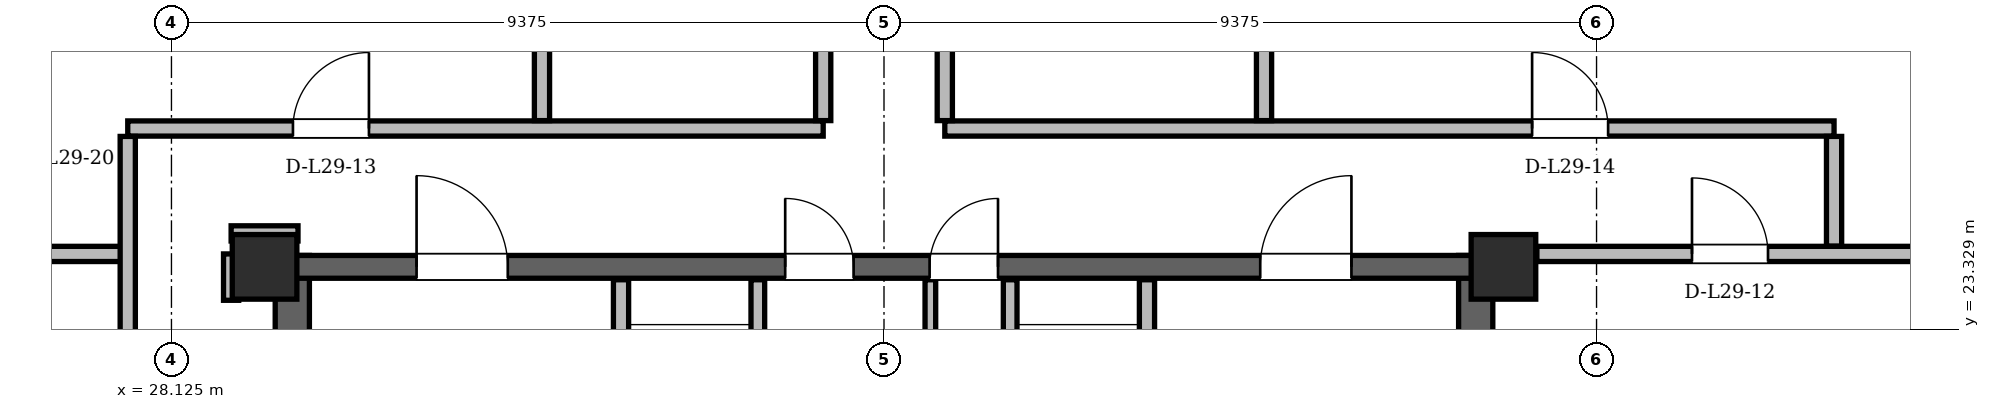
"""IFC4 building model, lengths in metres.
Left out: names, types, materials, properties, quantities, classifications, styles, units other than length and angle.
Written with IfcOpenShell. Run it as: python <this file> out.ifc"""

import sys

from ifc_helpers import new_model, si_unit, direction, frame, frame_2d, origin, origin_2d, place, context, subcontext, project, spatial, rectangle, hollow_rectangle, extrude, element, fill, save


model = new_model("IFC4")
c1 = context("Model", 3, precision=1e-05, world=origin(), true_north=direction((0.0, 1.0)))
c2 = subcontext(c1, "Body", "Model", "MODEL_VIEW")
j1 = project(units=[si_unit("LENGTHUNIT", "METRE"), si_unit("PLANEANGLEUNIT", "RADIAN")], contexts=[c1])
p1 = place(None, origin())
s1 = spatial("IfcSite", under=j1, at=p1, CompositionType="ELEMENT")
p2 = place(p1, origin())
s2 = spatial("IfcBuilding", under=s1, at=p2, CompositionType="ELEMENT")
p3 = place(p2, frame((0.0, 0.0, 112.2)))
s3 = spatial("IfcBuildingStorey", under=s2, at=p3, CompositionType="ELEMENT", Elevation=112.2)
for number, where, z_axis, x_axis in (
    (1, (45.65, 24.15, 0.0), (0.0, 0.0, 1.0), (1.0, 0.0, 0.0)),
    (2, (29.35, 24.15, 0.0), (0.0, 0.0, 1.0), (1.0, 0.0, 0.0)),
):
    element("IfcColumn", number, at=place(p3, frame(where, z_axis=z_axis, x_axis=x_axis)), inside=s3, PredefinedType="COLUMN", context=c2, shape_type="SweptSolid", body=[
        extrude(hollow_rectangle(XDim=0.85, YDim=0.85, WallThickness=0.07, at=origin_2d()), origin(), (0.0, 0.0, 1.0), 3.6),
    ])
for number, where, z_axis, x_axis in (
    (3, (29.715, 11.0, 0.0), (0.0, 0.0, 1.0), (0.0, 1.0, 0.0)),
    (4, (45.285, 11.0, 0.0), (0.0, 0.0, 1.0), (0.0, 1.0, 0.0)),
):
    element("IfcWall", number, at=place(p3, frame(where, z_axis=z_axis, x_axis=x_axis)), inside=s3, PredefinedType="SHEAR", context=c2, shape_type="SweptSolid", body=[
        extrude(rectangle(XDim=13.3, YDim=0.45, at=frame_2d((6.65, 0.0))), origin(), (0.0, 0.0, 1.0), 3.36),
    ])
p4 = place(p3, frame((29.65, 24.15, 0.0), z_axis=(0.0, 0.0, 1.0), x_axis=(1.0, 0.0, 0.0)))
e5 = element("IfcWall", 5, at=p4, inside=s3, PredefinedType="SHEAR", context=c2, shape_type="SweptSolid", body=[
    extrude(rectangle(XDim=15.7, YDim=0.3, at=frame_2d((7.85, 0.0))), origin(), (0.0, 0.0, 1.0), 3.36),
])
p5 = place(p4, frame((1.7, 0.0, 0.0)))
e6 = element("IfcOpeningElement", 6, at=p5, cuts=e5, PredefinedType="OPENING", context=c2, shape_type="SweptSolid", body=[
    extrude(rectangle(XDim=1.2, YDim=2.2, at=frame_2d((0.6, 1.1))), frame((0.0, 0.15, 0.0), z_axis=(0.0, -1.0, 0.0), x_axis=(1.0, 0.0, 0.0)), (0.0, 0.0, 1.0), 0.3),
])
p6 = place(p4, frame((12.8, 0.0, 0.0)))
e7 = element("IfcOpeningElement", 7, at=p6, cuts=e5, PredefinedType="OPENING", context=c2, shape_type="SweptSolid", body=[
    extrude(rectangle(XDim=1.2, YDim=2.2, at=frame_2d((0.6, 1.1))), frame((0.0, 0.15, 0.0), z_axis=(0.0, -1.0, 0.0), x_axis=(1.0, 0.0, 0.0)), (0.0, 0.0, 1.0), 0.3),
])
p7 = place(p4, frame((6.55, 0.0, 0.0)))
e8 = element("IfcOpeningElement", 8, at=p7, cuts=e5, PredefinedType="OPENING", context=c2, shape_type="SweptSolid", body=[
    extrude(rectangle(XDim=0.9, YDim=2.05, at=frame_2d((0.45, 1.025))), frame((0.0, 0.15, 0.0), z_axis=(0.0, -1.0, 0.0), x_axis=(1.0, 0.0, 0.0)), (0.0, 0.0, 1.0), 0.3),
])
p8 = place(p4, frame((8.45, 0.0, 0.0)))
e9 = element("IfcOpeningElement", 9, at=p8, cuts=e5, PredefinedType="OPENING", context=c2, shape_type="SweptSolid", body=[
    extrude(rectangle(XDim=0.9, YDim=2.05, at=frame_2d((0.45, 1.025))), frame((0.0, 0.15, 0.0), z_axis=(0.0, -1.0, 0.0), x_axis=(1.0, 0.0, 0.0)), (0.0, 0.0, 1.0), 0.3),
])
p9 = place(p3, frame((60.525, 13.33, 0.0), z_axis=(0.0, 0.0, 1.0), x_axis=(-0.500004027594, 0.866023078439, 0.0)))
e10 = element("IfcWall", 10, at=p9, inside=s3, PredefinedType="SOLIDWALL", context=c2, shape_type="SweptSolid", body=[
    extrude(rectangle(XDim=34.75, YDim=0.34, at=frame_2d((17.375, 0.0))), origin(), (0.0, 0.0, 1.0), 2.578),
])
p10 = place(p9, frame((6.369, 0.0, 0.0)))
e11 = element("IfcOpeningElement", 11, at=p10, cuts=e10, PredefinedType="OPENING", context=c2, shape_type="SweptSolid", body=[
    extrude(rectangle(XDim=1.5, YDim=2.2, at=frame_2d((0.75, 1.1))), frame((0.0, 0.17, 0.0), z_axis=(0.0, -1.0, 0.0), x_axis=(1.0, 0.0, 0.0)), (0.0, 0.0, 1.0), 0.34),
])
p11 = place(p9, frame((25.216, 0.0, 0.0)))
e12 = element("IfcOpeningElement", 12, at=p11, cuts=e10, PredefinedType="OPENING", context=c2, shape_type="SweptSolid", body=[
    extrude(rectangle(XDim=1.5, YDim=2.2, at=frame_2d((0.75, 1.1))), frame((0.0, 0.17, 0.0), z_axis=(0.0, -1.0, 0.0), x_axis=(1.0, 0.0, 0.0)), (0.0, 0.0, 1.0), 0.34),
])
p12 = place(p9, frame((3.22, 0.0, 0.85)))
e13 = element("IfcOpeningElement", 13, at=p12, cuts=e10, PredefinedType="OPENING", context=c2, shape_type="SweptSolid", body=[
    extrude(rectangle(XDim=1.2, YDim=1.48, at=frame_2d((0.6, 0.74))), frame((0.0, 0.17, 0.0), z_axis=(0.0, -1.0, 0.0), x_axis=(1.0, 0.0, 0.0)), (0.0, 0.0, 1.0), 0.34),
])
p13 = place(p9, frame((11.193, 0.0, 0.85)))
e14 = element("IfcOpeningElement", 14, at=p13, cuts=e10, PredefinedType="OPENING", context=c2, shape_type="SweptSolid", body=[
    extrude(rectangle(XDim=1.2, YDim=1.48, at=frame_2d((0.6, 0.74))), frame((0.0, 0.17, 0.0), z_axis=(0.0, -1.0, 0.0), x_axis=(1.0, 0.0, 0.0)), (0.0, 0.0, 1.0), 0.34),
])
p14 = place(p9, frame((14.913, 0.0, 0.85)))
e15 = element("IfcOpeningElement", 15, at=p14, cuts=e10, PredefinedType="OPENING", context=c2, shape_type="SweptSolid", body=[
    extrude(rectangle(XDim=2.2, YDim=1.618, at=frame_2d((1.1, 0.809))), frame((0.0, 0.17, 0.0), z_axis=(0.0, -1.0, 0.0), x_axis=(1.0, 0.0, 0.0)), (0.0, 0.0, 1.0), 0.34),
])
p15 = place(p9, frame((21.724, 0.0, 0.85)))
e16 = element("IfcOpeningElement", 16, at=p15, cuts=e10, PredefinedType="OPENING", context=c2, shape_type="SweptSolid", body=[
    extrude(rectangle(XDim=1.6, YDim=1.618, at=frame_2d((0.8, 0.809))), frame((0.0, 0.17, 0.0), z_axis=(0.0, -1.0, 0.0), x_axis=(1.0, 0.0, 0.0)), (0.0, 0.0, 1.0), 0.34),
])
p16 = place(p9, frame((31.928, 0.0, 0.85)))
e17 = element("IfcOpeningElement", 17, at=p16, cuts=e10, PredefinedType="OPENING", context=c2, shape_type="SweptSolid", body=[
    extrude(rectangle(XDim=1.4, YDim=1.6, at=frame_2d((0.7, 0.8))), frame((0.0, 0.17, 0.0), z_axis=(0.0, -1.0, 0.0), x_axis=(1.0, 0.0, 0.0)), (0.0, 0.0, 1.0), 0.34),
])
p17 = place(p3, frame((31.85, 43.425, 0.0), z_axis=(0.0, 0.0, 1.0), x_axis=(-0.500004027594, -0.866023078439, 0.0)))
e18 = element("IfcWall", 18, at=p17, inside=s3, PredefinedType="SOLIDWALL", context=c2, shape_type="SweptSolid", body=[
    extrude(rectangle(XDim=34.75, YDim=0.34, at=frame_2d((17.375, 0.0))), origin(), (0.0, 0.0, 1.0), 2.578),
])
p18 = place(p17, frame((6.369, 0.0, 0.0)))
e19 = element("IfcOpeningElement", 19, at=p18, cuts=e18, PredefinedType="OPENING", context=c2, shape_type="SweptSolid", body=[
    extrude(rectangle(XDim=1.5, YDim=2.2, at=frame_2d((0.75, 1.1))), frame((0.0, 0.17, 0.0), z_axis=(0.0, -1.0, 0.0), x_axis=(1.0, 0.0, 0.0)), (0.0, 0.0, 1.0), 0.34),
])
p19 = place(p17, frame((25.216, 0.0, 0.0)))
e20 = element("IfcOpeningElement", 20, at=p19, cuts=e18, PredefinedType="OPENING", context=c2, shape_type="SweptSolid", body=[
    extrude(rectangle(XDim=1.5, YDim=2.2, at=frame_2d((0.75, 1.1))), frame((0.0, 0.17, 0.0), z_axis=(0.0, -1.0, 0.0), x_axis=(1.0, 0.0, 0.0)), (0.0, 0.0, 1.0), 0.34),
])
p20 = place(p17, frame((32.486, 0.0, 0.85)))
e21 = element("IfcOpeningElement", 21, at=p20, cuts=e18, PredefinedType="OPENING", context=c2, shape_type="SweptSolid", body=[
    extrude(rectangle(XDim=1.2, YDim=1.48, at=frame_2d((0.6, 0.74))), frame((0.0, 0.17, 0.0), z_axis=(0.0, -1.0, 0.0), x_axis=(1.0, 0.0, 0.0)), (0.0, 0.0, 1.0), 0.34),
])
p21 = place(p17, frame((27.16, 0.0, 0.85)))
e22 = element("IfcOpeningElement", 22, at=p21, cuts=e18, PredefinedType="OPENING", context=c2, shape_type="SweptSolid", body=[
    extrude(rectangle(XDim=1.2, YDim=1.48, at=frame_2d((0.6, 0.74))), frame((0.0, 0.17, 0.0), z_axis=(0.0, -1.0, 0.0), x_axis=(1.0, 0.0, 0.0)), (0.0, 0.0, 1.0), 0.34),
])
p22 = place(p17, frame((3.218, 0.0, 0.85)))
e23 = element("IfcOpeningElement", 23, at=p22, cuts=e18, PredefinedType="OPENING", context=c2, shape_type="SweptSolid", body=[
    extrude(rectangle(XDim=1.2, YDim=1.48, at=frame_2d((0.6, 0.74))), frame((0.0, 0.17, 0.0), z_axis=(0.0, -1.0, 0.0), x_axis=(1.0, 0.0, 0.0)), (0.0, 0.0, 1.0), 0.34),
])
p23 = place(p17, frame((14.421, 0.0, 0.85)))
e24 = element("IfcOpeningElement", 24, at=p23, cuts=e18, PredefinedType="OPENING", context=c2, shape_type="SweptSolid", body=[
    extrude(rectangle(XDim=1.2, YDim=1.48, at=frame_2d((0.6, 0.74))), frame((0.0, 0.17, 0.0), z_axis=(0.0, -1.0, 0.0), x_axis=(1.0, 0.0, 0.0)), (0.0, 0.0, 1.0), 0.34),
])
p24 = place(p3, frame((34.04, 19.48, 0.0), z_axis=(0.0, 0.0, 1.0), x_axis=(0.0, 1.0, 0.0)))
e25 = element("IfcWall", 25, at=p24, inside=s3, PredefinedType="PARTITIONING", context=c2, shape_type="SweptSolid", body=[
    extrude(rectangle(XDim=4.5, YDim=0.2, at=frame_2d((2.25, 0.0))), origin(), (0.0, 0.0, 1.0), 2.4),
])
p25 = place(p24, frame((2.12, 0.0, 0.0)))
e26 = element("IfcOpeningElement", 26, at=p25, cuts=e25, PredefinedType="OPENING", context=c2, shape_type="SweptSolid", body=[
    extrude(rectangle(XDim=1.1, YDim=2.2, at=frame_2d((0.55, 1.1))), frame((0.0, 0.1, 0.0), z_axis=(0.0, -1.0, 0.0), x_axis=(1.0, 0.0, 0.0)), (0.0, 0.0, 1.0), 0.2),
])
p26 = place(p3, frame((35.84, 20.96, 0.0), z_axis=(0.0, 0.0, 1.0), x_axis=(0.0, 1.0, 0.0)))
e27 = element("IfcWall", 27, at=p26, inside=s3, PredefinedType="PARTITIONING", context=c2, shape_type="SweptSolid", body=[
    extrude(rectangle(XDim=3.02, YDim=0.18, at=frame_2d((1.51, 0.0))), origin(), (0.0, 0.0, 1.0), 2.4),
])
p27 = place(p3, frame((40.96, 19.48, 0.0), z_axis=(0.0, 0.0, 1.0), x_axis=(0.0, 1.0, 0.0)))
e28 = element("IfcWall", 28, at=p27, inside=s3, PredefinedType="PARTITIONING", context=c2, shape_type="SweptSolid", body=[
    extrude(rectangle(XDim=4.5, YDim=0.2, at=frame_2d((2.25, 0.0))), origin(), (0.0, 0.0, 1.0), 2.4),
])
p28 = place(p27, frame((2.12, 0.0, 0.0)))
e29 = element("IfcOpeningElement", 29, at=p28, cuts=e28, PredefinedType="OPENING", context=c2, shape_type="SweptSolid", body=[
    extrude(rectangle(XDim=1.1, YDim=2.2, at=frame_2d((0.55, 1.1))), frame((0.0, 0.1, 0.0), z_axis=(0.0, -1.0, 0.0), x_axis=(1.0, 0.0, 0.0)), (0.0, 0.0, 1.0), 0.2),
])
p29 = place(p3, frame((39.16, 20.96, 0.0), z_axis=(0.0, 0.0, 1.0), x_axis=(0.0, 1.0, 0.0)))
e30 = element("IfcWall", 30, at=p29, inside=s3, PredefinedType="PARTITIONING", context=c2, shape_type="SweptSolid", body=[
    extrude(rectangle(XDim=3.02, YDim=0.18, at=frame_2d((1.51, 0.0))), origin(), (0.0, 0.0, 1.0), 2.4),
])
p30 = place(p3, frame((38.11, 21.06, 0.0), z_axis=(0.0, 0.0, 1.0), x_axis=(0.0, 1.0, 0.0)))
e31 = element("IfcWall", 31, at=p30, inside=s3, PredefinedType="PARTITIONING", context=c2, shape_type="SweptSolid", body=[
    extrude(rectangle(XDim=2.92, YDim=0.14, at=frame_2d((1.46, 0.0))), origin(), (0.0, 0.0, 1.0), 2.4),
])
p31 = place(p3, frame((21.021, 24.32, 0.0), z_axis=(0.0, 0.0, 1.0), x_axis=(1.0, 0.0, 0.0)))
e32 = element("IfcWall", 32, at=p31, inside=s3, PredefinedType="PARTITIONING", context=c2, shape_type="SweptSolid", body=[
    extrude(rectangle(XDim=6.529, YDim=0.2, at=frame_2d((3.265, 0.0))), origin(), (0.0, 0.0, 1.0), 3.36),
])
p32 = place(p3, frame((46.09, 24.32, 0.0), z_axis=(0.0, 0.0, 1.0), x_axis=(1.0, 0.0, 0.0)))
e33 = element("IfcWall", 33, at=p32, inside=s3, PredefinedType="PARTITIONING", context=c2, shape_type="SweptSolid", body=[
    extrude(rectangle(XDim=7.889, YDim=0.2, at=frame_2d((3.944, 0.0))), origin(), (0.0, 0.0, 1.0), 2.946),
])
p33 = place(p32, frame((2.041, 0.0, 0.0)))
e34 = element("IfcOpeningElement", 34, at=p33, cuts=e33, PredefinedType="OPENING", context=c2, shape_type="SweptSolid", body=[
    extrude(rectangle(XDim=1.0, YDim=2.18, at=frame_2d((0.5, 1.09))), frame((0.0, 0.1, 0.0), z_axis=(0.0, -1.0, 0.0), x_axis=(1.0, 0.0, 0.0)), (0.0, 0.0, 1.0), 0.2),
])
p34 = place(p3, frame((28.91, 24.59, 0.0), z_axis=(0.0, 0.0, 1.0), x_axis=(1.0, 0.0, 0.0)))
e35 = element("IfcWall", 35, at=p34, inside=s3, PredefinedType="PARTITIONING", context=c2, shape_type="SweptSolid", body=[
    extrude(rectangle(XDim=0.88, YDim=0.2, at=frame_2d((0.44, 0.0))), origin(), (0.0, 0.0, 1.0), 2.814),
])
p35 = place(p3, frame((27.55, 25.97, 0.0), z_axis=(0.0, 0.0, 1.0), x_axis=(1.0, 0.0, 0.0)))
e36 = element("IfcWall", 36, at=p35, inside=s3, PredefinedType="PARTITIONING", context=c2, shape_type="SweptSolid", body=[
    extrude(rectangle(XDim=9.15, YDim=0.2, at=frame_2d((4.575, 0.0))), origin(), (0.0, 0.0, 1.0), 2.814),
])
p36 = place(p35, frame((2.173, 0.0, 0.0)))
e37 = element("IfcOpeningElement", 37, at=p36, cuts=e36, PredefinedType="OPENING", context=c2, shape_type="SweptSolid", body=[
    extrude(rectangle(XDim=1.0, YDim=2.18, at=frame_2d((0.5, 1.09))), frame((0.0, 0.1, 0.0), z_axis=(0.0, -1.0, 0.0), x_axis=(1.0, 0.0, 0.0)), (0.0, 0.0, 1.0), 0.2),
])
p37 = place(p3, frame((38.3, 25.97, 0.0), z_axis=(0.0, 0.0, 1.0), x_axis=(1.0, 0.0, 0.0)))
e38 = element("IfcWall", 38, at=p37, inside=s3, PredefinedType="PARTITIONING", context=c2, shape_type="SweptSolid", body=[
    extrude(rectangle(XDim=11.7, YDim=0.2, at=frame_2d((5.85, 0.0))), origin(), (0.0, 0.0, 1.0), 2.814),
])
p38 = place(p37, frame((7.727, 0.0, 0.0)))
e39 = element("IfcOpeningElement", 39, at=p38, cuts=e38, PredefinedType="OPENING", context=c2, shape_type="SweptSolid", body=[
    extrude(rectangle(XDim=1.0, YDim=2.18, at=frame_2d((0.5, 1.09))), frame((0.0, 0.1, 0.0), z_axis=(0.0, -1.0, 0.0), x_axis=(1.0, 0.0, 0.0)), (0.0, 0.0, 1.0), 0.2),
])
p39 = place(p3, frame((27.55, 18.554, 0.0), z_axis=(0.0, 0.0, 1.0), x_axis=(0.0, 1.0, 0.0)))
e40 = element("IfcWall", 40, at=p39, inside=s3, PredefinedType="PARTITIONING", context=c2, shape_type="SweptSolid", body=[
    extrude(rectangle(XDim=7.312, YDim=0.2, at=frame_2d((3.656, 0.0))), origin(), (0.0, 0.0, 1.0), 3.36),
])
p40 = place(p3, frame((28.91, 23.71, 0.0), z_axis=(0.0, 0.0, 1.0), x_axis=(0.0, 1.0, 0.0)))
e41 = element("IfcWall", 41, at=p40, inside=s3, PredefinedType="PARTITIONING", context=c2, shape_type="SweptSolid", body=[
    extrude(rectangle(XDim=0.61, YDim=0.2, at=frame_2d((0.305, 0.0))), origin(), (0.0, 0.0, 1.0), 3.36),
])
p41 = place(p3, frame((33.0, 26.074, 0.0), z_axis=(0.0, 0.0, 1.0), x_axis=(0.0, 1.0, 0.0)))
e42 = element("IfcWall", 42, at=p41, inside=s3, PredefinedType="PARTITIONING", context=c2, shape_type="SweptSolid", body=[
    extrude(rectangle(XDim=17.177, YDim=0.2, at=frame_2d((8.588, 0.0))), origin(), (0.0, 0.0, 1.0), 3.36),
])
p42 = place(p3, frame((36.7, 26.074, 0.0), z_axis=(0.0, 0.0, 1.0), x_axis=(0.0, 1.0, 0.0)))
e43 = element("IfcWall", 43, at=p42, inside=s3, PredefinedType="PARTITIONING", context=c2, shape_type="SweptSolid", body=[
    extrude(rectangle(XDim=17.177, YDim=0.2, at=frame_2d((8.588, 0.0))), origin(), (0.0, 0.0, 1.0), 3.36),
])
p43 = place(p42, frame((8.539, 0.0, 0.0)))
e44 = element("IfcOpeningElement", 44, at=p43, cuts=e43, PredefinedType="OPENING", context=c2, shape_type="SweptSolid", body=[
    extrude(rectangle(XDim=1.0, YDim=2.18, at=frame_2d((0.5, 1.09))), frame((0.0, 0.1, 0.0), z_axis=(0.0, -1.0, 0.0), x_axis=(1.0, 0.0, 0.0)), (0.0, 0.0, 1.0), 0.2),
])
p44 = place(p3, frame((38.3, 26.074, 0.0), z_axis=(0.0, 0.0, 1.0), x_axis=(0.0, 1.0, 0.0)))
e45 = element("IfcWall", 45, at=p44, inside=s3, PredefinedType="PARTITIONING", context=c2, shape_type="SweptSolid", body=[
    extrude(rectangle(XDim=13.422, YDim=0.2, at=frame_2d((6.711, 0.0))), origin(), (0.0, 0.0, 1.0), 3.36),
])
p45 = place(p44, frame((8.539, 0.0, 0.0)))
e46 = element("IfcOpeningElement", 46, at=p45, cuts=e45, PredefinedType="OPENING", context=c2, shape_type="SweptSolid", body=[
    extrude(rectangle(XDim=1.0, YDim=2.18, at=frame_2d((0.5, 1.09))), frame((0.0, 0.1, 0.0), z_axis=(0.0, -1.0, 0.0), x_axis=(1.0, 0.0, 0.0)), (0.0, 0.0, 1.0), 0.2),
])
p46 = place(p3, frame((42.5, 26.074, 0.0), z_axis=(0.0, 0.0, 1.0), x_axis=(0.0, 1.0, 0.0)))
e47 = element("IfcWall", 47, at=p46, inside=s3, PredefinedType="PARTITIONING", context=c2, shape_type="SweptSolid", body=[
    extrude(rectangle(XDim=17.177, YDim=0.2, at=frame_2d((8.588, 0.0))), origin(), (0.0, 0.0, 1.0), 3.36),
])
p47 = place(p3, frame((50.0, 24.424, 0.0), z_axis=(0.0, 0.0, 1.0), x_axis=(0.0, 1.0, 0.0)))
e48 = element("IfcWall", 48, at=p47, inside=s3, PredefinedType="PARTITIONING", context=c2, shape_type="SweptSolid", body=[
    extrude(rectangle(XDim=1.442, YDim=0.2, at=frame_2d((0.721, 0.0))), origin(), (0.0, 0.0, 1.0), 3.36),
])
p48 = place(p5, origin())
e49 = element("IfcDoor", 49, at=p48, inside=s3, OperationType="SINGLE_SWING_LEFT", PredefinedType="DOOR", context=c2, shape_type="SweptSolid", body=[
    extrude(rectangle(XDim=1.2, YDim=2.2, at=frame_2d((0.6, 1.1))), frame((0.0, 0.025, 0.0), z_axis=(0.0, -1.0, 0.0), x_axis=(1.0, 0.0, 0.0)), (0.0, 0.0, 1.0), 0.05),
])
fill(e6, e49)
p49 = place(p6, origin())
e50 = element("IfcDoor", 50, at=p49, inside=s3, OperationType="SINGLE_SWING_RIGHT", PredefinedType="DOOR", context=c2, shape_type="SweptSolid", body=[
    extrude(rectangle(XDim=1.2, YDim=2.2, at=frame_2d((0.6, 1.1))), frame((0.0, 0.025, 0.0), z_axis=(0.0, -1.0, 0.0), x_axis=(1.0, 0.0, 0.0)), (0.0, 0.0, 1.0), 0.05),
])
fill(e7, e50)
p50 = place(p7, origin())
e51 = element("IfcDoor", 51, at=p50, inside=s3, OperationType="SINGLE_SWING_LEFT", PredefinedType="DOOR", context=c2, shape_type="SweptSolid", body=[
    extrude(rectangle(XDim=0.9, YDim=2.05, at=frame_2d((0.45, 1.025))), frame((0.0, 0.025, 0.0), z_axis=(0.0, -1.0, 0.0), x_axis=(1.0, 0.0, 0.0)), (0.0, 0.0, 1.0), 0.05),
])
fill(e8, e51)
p51 = place(p8, origin())
e52 = element("IfcDoor", 52, at=p51, inside=s3, OperationType="SINGLE_SWING_RIGHT", PredefinedType="DOOR", context=c2, shape_type="SweptSolid", body=[
    extrude(rectangle(XDim=0.9, YDim=2.05, at=frame_2d((0.45, 1.025))), frame((0.0, 0.025, 0.0), z_axis=(0.0, -1.0, 0.0), x_axis=(1.0, 0.0, 0.0)), (0.0, 0.0, 1.0), 0.05),
])
fill(e9, e52)
p52 = place(p33, origin())
e53 = element("IfcDoor", 53, at=p52, inside=s3, OperationType="SINGLE_SWING_LEFT", PredefinedType="DOOR", context=c2, shape_type="SweptSolid", body=[
    extrude(rectangle(XDim=1.0, YDim=2.18, at=frame_2d((0.5, 1.09))), frame((0.0, 0.025, 0.0), z_axis=(0.0, -1.0, 0.0), x_axis=(1.0, 0.0, 0.0)), (0.0, 0.0, 1.0), 0.05),
])
fill(e34, e53)
p53 = place(p36, origin())
e54 = element("IfcDoor", 54, at=p53, inside=s3, OperationType="SINGLE_SWING_RIGHT", PredefinedType="DOOR", context=c2, shape_type="SweptSolid", body=[
    extrude(rectangle(XDim=1.0, YDim=2.18, at=frame_2d((0.5, 1.09))), frame((0.0, 0.025, 0.0), z_axis=(0.0, -1.0, 0.0), x_axis=(1.0, 0.0, 0.0)), (0.0, 0.0, 1.0), 0.05),
])
fill(e37, e54)
p54 = place(p38, origin())
e55 = element("IfcDoor", 55, at=p54, inside=s3, OperationType="SINGLE_SWING_LEFT", PredefinedType="DOOR", context=c2, shape_type="SweptSolid", body=[
    extrude(rectangle(XDim=1.0, YDim=2.18, at=frame_2d((0.5, 1.09))), frame((0.0, 0.025, 0.0), z_axis=(0.0, -1.0, 0.0), x_axis=(1.0, 0.0, 0.0)), (0.0, 0.0, 1.0), 0.05),
])
fill(e39, e55)
save(model, sys.argv[1])
